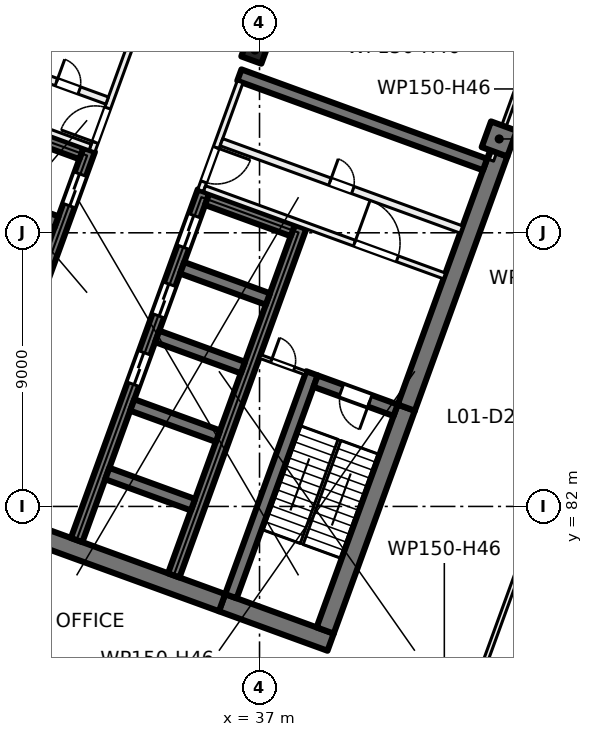
"""IFC4 building model, lengths in metres.
Left out: names, types, materials, properties, quantities, classifications, styles, units other than length and angle.
Written with IfcOpenShell. Run it as: python <this file> out.ifc"""

import sys

from ifc_helpers import new_model, si_unit, direction, frame, frame_2d, origin, origin_2d, place, context, subcontext, project, spatial, rectangle, extrude, element, fill, save


model = new_model("IFC4")
c1 = context("Model", 3, precision=1e-05, world=origin(), true_north=direction((0.0, 1.0)))
c2 = subcontext(c1, "Body", "Model", "MODEL_VIEW")
j1 = project(units=[si_unit("LENGTHUNIT", "METRE"), si_unit("PLANEANGLEUNIT", "RADIAN")], contexts=[c1])
p1 = place(None, origin())
s1 = spatial("IfcSite", under=j1, at=p1, CompositionType="ELEMENT")
p2 = place(p1, origin())
s2 = spatial("IfcBuilding", under=s1, at=p2, CompositionType="ELEMENT")
p3 = place(p2, frame((0.0, 0.0, 7.5)))
s3 = spatial("IfcBuildingStorey", under=s2, at=p3, CompositionType="ELEMENT", Elevation=7.5)
p4 = place(p3, frame((36.849, 97.011, 0.0), z_axis=(0.0, 0.0, 1.0), x_axis=(-0.342020143326, -0.939692620786, 0.0)))
e1 = element("IfcColumn", 1, at=p4, inside=s3, PredefinedType="COLUMN", context=c2, shape_type="SweptSolid", body=[
    extrude(rectangle(XDim=0.7, YDim=0.7, at=origin_2d()), origin(), (0.0, 0.0, 1.0), 5.0),
])
p5 = place(p3, frame((44.884, 94.087, 0.0), z_axis=(0.0, 0.0, 1.0), x_axis=(-0.342020143326, -0.939692620786, 0.0)))
e2 = element("IfcColumn", 2, at=p5, inside=s3, PredefinedType="COLUMN", context=c2, shape_type="SweptSolid", body=[
    extrude(rectangle(XDim=0.9, YDim=0.9, at=origin_2d()), origin(), (0.0, 0.0, 1.0), 5.0),
])
p6 = place(p3, frame((39.338, 77.535, 0.0), z_axis=(0.0, 0.0, 1.0), x_axis=(-0.939701471648, 0.341995824804, 0.0)))
e3 = element("IfcWall", 3, at=p6, inside=s3, PredefinedType="SHEAR", context=c2, shape_type="SweptSolid", body=[
    extrude(rectangle(XDim=3.8, YDim=0.6, at=frame_2d((1.9, 0.0))), origin(), (0.0, 0.0, 1.0), 5.0),
])
p7 = place(p3, frame((35.767, 78.835, 0.0), z_axis=(0.0, 0.0, 1.0), x_axis=(-0.939692894512, 0.342019391267, 0.0)))
e4 = element("IfcWall", 4, at=p7, inside=s3, PredefinedType="SHEAR", context=c2, shape_type="SweptSolid", body=[
    extrude(rectangle(XDim=14.4, YDim=0.6, at=frame_2d((7.2, 0.0))), origin(), (0.0, 0.0, 1.0), 5.0),
])
p8 = place(p3, frame((39.159, 77.92, 0.0), z_axis=(0.0, 0.0, 1.0), x_axis=(0.342016982193, 0.939693771338, 0.0)))
e5 = element("IfcWall", 5, at=p8, inside=s3, PredefinedType="SHEAR", context=c2, shape_type="SweptSolid", body=[
    extrude(rectangle(XDim=7.8, YDim=0.6, at=frame_2d((3.9, 0.0))), origin(), (0.0, 0.0, 1.0), 5.0),
])
p9 = place(p3, frame((41.827, 85.249, 0.0), z_axis=(0.0, 0.0, 1.0), x_axis=(0.342016162452, 0.939694069696, 0.0)))
e6 = element("IfcWall", 6, at=p9, inside=s3, PredefinedType="SHEAR", context=c2, shape_type="SweptSolid", body=[
    extrude(rectangle(XDim=8.9, YDim=0.6, at=frame_2d((4.45, 0.0))), origin(), (0.0, 0.0, 1.0), 5.0),
])
p10 = place(p3, frame((36.058, 79.048, 0.0), z_axis=(0.0, 0.0, 1.0), x_axis=(0.342016982193, 0.939693771338, 0.0)))
e7 = element("IfcWall", 7, at=p10, inside=s3, PredefinedType="SHEAR", context=c2, shape_type="SweptSolid", body=[
    extrude(rectangle(XDim=7.8, YDim=0.4, at=frame_2d((3.9, 0.0))), origin(), (0.0, 0.0, 1.0), 5.0),
])
p11 = place(p3, frame((41.476, 85.164, 0.0), z_axis=(0.0, 0.0, 1.0), x_axis=(-0.939678810556, 0.342058084236, 0.0)))
e8 = element("IfcWall", 8, at=p11, inside=s3, PredefinedType="SHEAR", context=c2, shape_type="SweptSolid", body=[
    extrude(rectangle(XDim=2.8, YDim=0.4, at=frame_2d((1.4, 0.0))), origin(), (0.0, 0.0, 1.0), 5.0),
])
p12 = place(p11, frame((0.9, 0.0, 0.0)))
e9 = element("IfcOpeningElement", 9, at=p12, cuts=e8, PredefinedType="OPENING", context=c2, shape_type="SweptSolid", body=[
    extrude(rectangle(XDim=1.0, YDim=2.1, at=frame_2d((0.5, 1.05))), frame((0.0, 0.21, 0.0), z_axis=(0.0, -1.0, 0.0), x_axis=(1.0, 0.0, 0.0)), (0.0, 0.0, 1.0), 0.42),
])
p13 = place(p3, frame((30.984, 80.895, 0.0), z_axis=(0.0, 0.0, 1.0), x_axis=(0.342021021735, 0.939692301071, 0.0)))
e10 = element("IfcWall", 10, at=p13, inside=s3, PredefinedType="SHEAR", context=c2, shape_type="SweptSolid", body=[
    extrude(rectangle(XDim=12.2, YDim=0.4, at=frame_2d((6.1, 0.0))), origin(), (0.0, 0.0, 1.0), 5.0),
])
p14 = place(p13, frame((5.45, 0.0, 0.0)))
e11 = element("IfcOpeningElement", 11, at=p14, cuts=e10, PredefinedType="OPENING", context=c2, shape_type="SweptSolid", body=[
    extrude(rectangle(XDim=1.1, YDim=2.1, at=frame_2d((0.55, 1.05))), frame((0.0, 0.21, 0.0), z_axis=(0.0, -1.0, 0.0), x_axis=(1.0, 0.0, 0.0)), (0.0, 0.0, 1.0), 0.42),
])
p15 = place(p13, frame((7.85, 0.0, 0.0)))
e12 = element("IfcOpeningElement", 12, at=p15, cuts=e10, PredefinedType="OPENING", context=c2, shape_type="SweptSolid", body=[
    extrude(rectangle(XDim=1.1, YDim=2.1, at=frame_2d((0.55, 1.05))), frame((0.0, 0.21, 0.0), z_axis=(0.0, -1.0, 0.0), x_axis=(1.0, 0.0, 0.0)), (0.0, 0.0, 1.0), 0.42),
])
p16 = place(p13, frame((10.25, 0.0, 0.0)))
e13 = element("IfcOpeningElement", 13, at=p16, cuts=e10, PredefinedType="OPENING", context=c2, shape_type="SweptSolid", body=[
    extrude(rectangle(XDim=1.1, YDim=2.1, at=frame_2d((0.55, 1.05))), frame((0.0, 0.21, 0.0), z_axis=(0.0, -1.0, 0.0), x_axis=(1.0, 0.0, 0.0)), (0.0, 0.0, 1.0), 0.42),
])
p17 = place(p3, frame((34.178, 79.732, 0.0), z_axis=(0.0, 0.0, 1.0), x_axis=(0.342014590177, 0.939694641948, 0.0)))
e14 = element("IfcWall", 14, at=p17, inside=s3, PredefinedType="SHEAR", context=c2, shape_type="SweptSolid", body=[
    extrude(rectangle(XDim=12.2, YDim=0.4, at=frame_2d((6.1, 0.0))), origin(), (0.0, 0.0, 1.0), 5.0),
])
for number, where, z_axis, x_axis in (
    (15, (34.812, 82.056, 0.0), (0.0, 0.0, 1.0), (-0.94, 0.342, 0.0)),
    (16, (35.632, 84.311, 0.0), (0.0, 0.0, 1.0), (-0.94, 0.342, 0.0)),
    (17, (36.453, 86.566, 0.0), (0.0, 0.0, 1.0), (-0.94, 0.342, 0.0)),
    (18, (37.274, 88.822, 0.0), (0.0, 0.0, 1.0), (-0.94, 0.342, 0.0)),
):
    element("IfcWall", number, at=place(p3, frame(where, z_axis=z_axis, x_axis=x_axis)), inside=s3, PredefinedType="SHEAR", context=c2, shape_type="SweptSolid", body=[
        extrude(rectangle(XDim=3.0, YDim=0.4, at=frame_2d((1.5, 0.0))), origin(), (0.0, 0.0, 1.0), 5.0),
    ])
p18 = place(p3, frame((38.095, 91.077, 0.0), z_axis=(0.0, 0.0, 1.0), x_axis=(-0.939676934218, 0.342063238742, 0.0)))
e19 = element("IfcWall", 19, at=p18, inside=s3, PredefinedType="SHEAR", context=c2, shape_type="SweptSolid", body=[
    extrude(rectangle(XDim=3.0, YDim=0.4, at=frame_2d((1.5, 0.0))), origin(), (0.0, 0.0, 1.0), 5.0),
])
p19 = place(p3, frame((27.225, 82.263, 0.0), z_axis=(0.0, 0.0, 1.0), x_axis=(0.342014590177, 0.939694641948, 0.0)))
e20 = element("IfcWall", 20, at=p19, inside=s3, PredefinedType="SHEAR", context=c2, shape_type="SweptSolid", body=[
    extrude(rectangle(XDim=12.2, YDim=0.4, at=frame_2d((6.1, 0.0))), origin(), (0.0, 0.0, 1.0), 5.0),
])
p20 = place(p19, frame((10.25, 0.0, 0.0)))
e21 = element("IfcOpeningElement", 21, at=p20, cuts=e20, PredefinedType="OPENING", context=c2, shape_type="SweptSolid", body=[
    extrude(rectangle(XDim=1.1, YDim=2.1, at=frame_2d((0.55, 1.05))), frame((0.0, 0.21, 0.0), z_axis=(0.0, -1.0, 0.0), x_axis=(1.0, 0.0, 0.0)), (0.0, 0.0, 1.0), 0.42),
])
p21 = place(p19, frame((0.7, 0.0, 0.0)))
e22 = element("IfcOpeningElement", 22, at=p21, cuts=e20, PredefinedType="OPENING", context=c2, shape_type="SweptSolid", body=[
    extrude(rectangle(XDim=0.8, YDim=2.1, at=frame_2d((0.4, 1.05))), frame((0.0, 0.21, 0.0), z_axis=(0.0, -1.0, 0.0), x_axis=(1.0, 0.0, 0.0)), (0.0, 0.0, 1.0), 0.42),
])
for number, where, z_axis, x_axis in (
    (23, (30.32, 91.353, 0.0), (0.0, 0.0, 1.0), (-0.94, 0.342, 0.0)),
    (24, (31.141, 93.608, 0.0), (0.0, 0.0, 1.0), (-0.94, 0.342, 0.0)),
):
    element("IfcWall", number, at=place(p3, frame(where, z_axis=z_axis, x_axis=x_axis)), inside=s3, PredefinedType="SHEAR", context=c2, shape_type="SweptSolid", body=[
        extrude(rectangle(XDim=3.0, YDim=0.4, at=frame_2d((1.5, 0.0))), origin(), (0.0, 0.0, 1.0), 5.0),
    ])
p22 = place(p3, frame((44.418, 93.245, 0.0), z_axis=(0.0, 0.0, 1.0), x_axis=(-0.93969060187, 0.342025690201, 0.0)))
e25 = element("IfcWall", 25, at=p22, inside=s3, PredefinedType="SHEAR", context=c2, shape_type="SweptSolid", body=[
    extrude(rectangle(XDim=8.6, YDim=0.4, at=frame_2d((4.3, 0.0))), origin(), (0.0, 0.0, 1.0), 5.0),
])
p23 = place(p3, frame((31.491, 93.693, 0.0), z_axis=(0.0, 0.0, 1.0), x_axis=(0.341995824804, 0.939701471648, 0.0)))
e26 = element("IfcWall", 26, at=p23, inside=s3, PredefinedType="PARTITIONING", context=c2, shape_type="SweptSolid", body=[
    extrude(rectangle(XDim=3.8, YDim=0.2, at=frame_2d((1.9, 0.0))), origin(), (0.0, 0.0, 1.0), 4.6),
])
p24 = place(p23, frame((0.3, 0.0, 0.0)))
e27 = element("IfcOpeningElement", 27, at=p24, cuts=e26, PredefinedType="OPENING", context=c2, shape_type="SweptSolid", body=[
    extrude(rectangle(XDim=1.2, YDim=2.1, at=frame_2d((0.6, 1.05))), frame((0.0, 0.11, 0.0), z_axis=(0.0, -1.0, 0.0), x_axis=(1.0, 0.0, 0.0)), (0.0, 0.0, 1.0), 0.22),
])
p25 = place(p3, frame((23.538, 96.694, 0.0), z_axis=(0.0, 0.0, 1.0), x_axis=(0.939691552312, -0.342023078919, 0.0)))
e28 = element("IfcWall", 28, at=p25, inside=s3, PredefinedType="PARTITIONING", context=c2, shape_type="SweptSolid", body=[
    extrude(rectangle(XDim=8.4, YDim=0.2, at=frame_2d((4.2, 0.0))), origin(), (0.0, 0.0, 1.0), 4.6),
])
p26 = place(p25, frame((1.65, 0.0, 0.0)))
e29 = element("IfcOpeningElement", 29, at=p26, cuts=e28, PredefinedType="OPENING", context=c2, shape_type="SweptSolid", body=[
    extrude(rectangle(XDim=1.5, YDim=2.1, at=frame_2d((0.75, 1.05))), frame((0.0, 0.11, 0.0), z_axis=(0.0, -1.0, 0.0), x_axis=(1.0, 0.0, 0.0)), (0.0, 0.0, 1.0), 0.22),
])
p27 = place(p3, frame((24.094, 98.221, 0.0), z_axis=(0.0, 0.0, 1.0), x_axis=(0.939691552312, -0.342023078919, 0.0)))
e30 = element("IfcWall", 30, at=p27, inside=s3, PredefinedType="PARTITIONING", context=c2, shape_type="SweptSolid", body=[
    extrude(rectangle(XDim=8.4, YDim=0.25, at=frame_2d((4.2, 0.0))), origin(), (0.0, 0.0, 1.0), 4.6),
])
p28 = place(p27, frame((6.625, 0.0, 0.0)))
e31 = element("IfcOpeningElement", 31, at=p28, cuts=e30, PredefinedType="OPENING", context=c2, shape_type="SweptSolid", body=[
    extrude(rectangle(XDim=0.8, YDim=2.1, at=frame_2d((0.4, 1.05))), frame((0.0, 0.135, 0.0), z_axis=(0.0, -1.0, 0.0), x_axis=(1.0, 0.0, 0.0)), (0.0, 0.0, 1.0), 0.27),
])
p29 = place(p27, frame((2.275, 0.0, 0.0)))
e32 = element("IfcOpeningElement", 32, at=p29, cuts=e30, PredefinedType="OPENING", context=c2, shape_type="SweptSolid", body=[
    extrude(rectangle(XDim=1.0, YDim=2.1, at=frame_2d((0.5, 1.05))), frame((0.0, 0.135, 0.0), z_axis=(0.0, -1.0, 0.0), x_axis=(1.0, 0.0, 0.0)), (0.0, 0.0, 1.0), 0.27),
])
p30 = place(p3, frame((36.362, 95.964, 0.0), z_axis=(0.0, 0.0, 1.0), x_axis=(-0.341995824804, -0.939701471648, 0.0)))
e33 = element("IfcWall", 33, at=p30, inside=s3, PredefinedType="PARTITIONING", context=c2, shape_type="SweptSolid", body=[
    extrude(rectangle(XDim=3.8, YDim=0.2, at=frame_2d((1.9, 0.0))), origin(), (0.0, 0.0, 1.0), 4.6),
])
p31 = place(p30, frame((2.3, 0.0, 0.0)))
e34 = element("IfcOpeningElement", 34, at=p31, cuts=e33, PredefinedType="OPENING", context=c2, shape_type="SweptSolid", body=[
    extrude(rectangle(XDim=1.2, YDim=2.1, at=frame_2d((0.6, 1.05))), frame((0.0, 0.11, 0.0), z_axis=(0.0, -1.0, 0.0), x_axis=(1.0, 0.0, 0.0)), (0.0, 0.0, 1.0), 0.22),
])
p32 = place(p3, frame((35.19, 92.453, 0.0), z_axis=(0.0, 0.0, 1.0), x_axis=(0.939691552312, -0.342023078919, 0.0)))
e35 = element("IfcWall", 35, at=p32, inside=s3, PredefinedType="PARTITIONING", context=c2, shape_type="SweptSolid", body=[
    extrude(rectangle(XDim=8.4, YDim=0.2, at=frame_2d((4.2, 0.0))), origin(), (0.0, 0.0, 1.0), 4.6),
])
p33 = place(p32, frame((5.25, 0.0, 0.0)))
e36 = element("IfcOpeningElement", 36, at=p33, cuts=e35, PredefinedType="OPENING", context=c2, shape_type="SweptSolid", body=[
    extrude(rectangle(XDim=1.5, YDim=2.1, at=frame_2d((0.75, 1.05))), frame((0.0, 0.11, 0.0), z_axis=(0.0, -1.0, 0.0), x_axis=(1.0, 0.0, 0.0)), (0.0, 0.0, 1.0), 0.22),
])
p34 = place(p3, frame((35.746, 93.98, 0.0), z_axis=(0.0, 0.0, 1.0), x_axis=(0.939691552312, -0.342023078919, 0.0)))
e37 = element("IfcWall", 37, at=p34, inside=s3, PredefinedType="PARTITIONING", context=c2, shape_type="SweptSolid", body=[
    extrude(rectangle(XDim=8.4, YDim=0.25, at=frame_2d((4.2, 0.0))), origin(), (0.0, 0.0, 1.0), 4.6),
])
p35 = place(p34, frame((3.8, 0.0, 0.0)))
e38 = element("IfcOpeningElement", 38, at=p35, cuts=e37, PredefinedType="OPENING", context=c2, shape_type="SweptSolid", body=[
    extrude(rectangle(XDim=0.8, YDim=2.1, at=frame_2d((0.4, 1.05))), frame((0.0, 0.135, 0.0), z_axis=(0.0, -1.0, 0.0), x_axis=(1.0, 0.0, 0.0)), (0.0, 0.0, 1.0), 0.27),
])
p36 = place(p3, frame((37.013, 86.935, 0.0), z_axis=(0.0, 0.0, 1.0), x_axis=(0.939659694648, -0.342110593602, 0.0)))
e39 = element("IfcWall", 39, at=p36, inside=s3, PredefinedType="PARTITIONING", context=c2, shape_type="SweptSolid", body=[
    extrude(rectangle(XDim=1.6, YDim=0.125, at=frame_2d((0.8, 0.0))), origin(), (0.0, 0.0, 1.0), 4.6),
])
p37 = place(p36, frame((0.4, 0.0, 0.0)))
e40 = element("IfcOpeningElement", 40, at=p37, cuts=e39, PredefinedType="OPENING", context=c2, shape_type="SweptSolid", body=[
    extrude(rectangle(XDim=0.8, YDim=2.1, at=frame_2d((0.4, 1.05))), frame((0.0, 0.073, 0.0), z_axis=(0.0, -1.0, 0.0), x_axis=(1.0, 0.0, 0.0)), (0.0, 0.0, 1.0), 0.145),
])
p38 = place(p3, frame((36.0, 73.11, 0.0), z_axis=(0.0, 0.0, 1.0), x_axis=(-0.939696975073, 0.342008179784, 0.0)))
e41 = element("IfcWall", 41, at=p38, inside=s3, PredefinedType="PARTITIONING", context=c2, shape_type="SweptSolid", body=[
    extrude(rectangle(XDim=19.075, YDim=0.15, at=frame_2d((9.538, 0.0))), origin(), (0.0, 0.0, 1.0), 4.6),
])
p39 = place(p38, frame((9.076, 0.0, 0.0)))
e42 = element("IfcOpeningElement", 42, at=p39, cuts=e41, PredefinedType="OPENING", context=c2, shape_type="SweptSolid", body=[
    extrude(rectangle(XDim=1.0, YDim=2.1, at=frame_2d((0.5, 1.05))), frame((0.0, 0.085, 0.0), z_axis=(0.0, -1.0, 0.0), x_axis=(1.0, 0.0, 0.0)), (0.0, 0.0, 1.0), 0.17),
])
p40 = place(p3, frame((49.196, 90.0, 0.0), z_axis=(0.0, 0.0, 1.0), x_axis=(-0.342037332118, -0.939686364399, 0.0)))
e43 = element("IfcWall", 43, at=p40, inside=s3, PredefinedType="PARTITIONING", context=c2, shape_type="SweptSolid", body=[
    extrude(rectangle(XDim=15.387, YDim=0.15, at=frame_2d((7.693, 0.0))), origin(), (0.0, 0.0, 1.0), 4.6),
])
p41 = place(p40, frame((6.99, 0.0, 0.0)))
e44 = element("IfcOpeningElement", 44, at=p41, cuts=e43, PredefinedType="OPENING", context=c2, shape_type="SweptSolid", body=[
    extrude(rectangle(XDim=1.0, YDim=2.1, at=frame_2d((0.5, 1.05))), frame((0.0, 0.085, 0.0), z_axis=(0.0, -1.0, 0.0), x_axis=(1.0, 0.0, 0.0)), (0.0, 0.0, 1.0), 0.17),
])
p42 = place(p3, frame((44.627, 93.382, 0.0), z_axis=(0.0, 0.0, 1.0), x_axis=(0.342025351501, 0.939690725149, 0.0)))
e45 = element("IfcWall", 45, at=p42, inside=s3, PredefinedType="PARTITIONING", context=c2, shape_type="SweptSolid", body=[
    extrude(rectangle(XDim=5.0, YDim=0.15, at=frame_2d((2.5, 0.0))), origin(), (0.0, 0.0, 1.0), 4.6),
])
p43 = place(p20, origin())
e46 = element("IfcDoor", 46, at=p43, inside=s3, OperationType="DOUBLE_DOOR_SLIDING", PredefinedType="DOOR", context=c2, shape_type="SweptSolid", body=[
    extrude(rectangle(XDim=1.1, YDim=2.1, at=frame_2d((0.55, 1.05))), frame((0.0, 0.025, 0.0), z_axis=(0.0, -1.0, 0.0), x_axis=(1.0, 0.0, 0.0)), (0.0, 0.0, 1.0), 0.05),
])
fill(e21, e46)
p44 = place(p14, origin())
e47 = element("IfcDoor", 47, at=p44, inside=s3, OperationType="DOUBLE_DOOR_SLIDING", PredefinedType="DOOR", context=c2, shape_type="SweptSolid", body=[
    extrude(rectangle(XDim=1.1, YDim=2.1, at=frame_2d((0.55, 1.05))), frame((0.0, 0.025, 0.0), z_axis=(0.0, -1.0, 0.0), x_axis=(1.0, 0.0, 0.0)), (0.0, 0.0, 1.0), 0.05),
])
fill(e11, e47)
p45 = place(p15, origin())
e48 = element("IfcDoor", 48, at=p45, inside=s3, OperationType="DOUBLE_DOOR_SLIDING", PredefinedType="DOOR", context=c2, shape_type="SweptSolid", body=[
    extrude(rectangle(XDim=1.1, YDim=2.1, at=frame_2d((0.55, 1.05))), frame((0.0, 0.025, 0.0), z_axis=(0.0, -1.0, 0.0), x_axis=(1.0, 0.0, 0.0)), (0.0, 0.0, 1.0), 0.05),
])
fill(e12, e48)
p46 = place(p16, origin())
e49 = element("IfcDoor", 49, at=p46, inside=s3, OperationType="DOUBLE_DOOR_SLIDING", PredefinedType="DOOR", context=c2, shape_type="SweptSolid", body=[
    extrude(rectangle(XDim=1.1, YDim=2.1, at=frame_2d((0.55, 1.05))), frame((0.0, 0.025, 0.0), z_axis=(0.0, -1.0, 0.0), x_axis=(1.0, 0.0, 0.0)), (0.0, 0.0, 1.0), 0.05),
])
fill(e13, e49)
p47 = place(p24, origin())
e50 = element("IfcDoor", 50, at=p47, inside=s3, OperationType="DOUBLE_DOOR_SINGLE_SWING", PredefinedType="DOOR", context=c2, shape_type="SweptSolid", body=[
    extrude(rectangle(XDim=1.2, YDim=2.1, at=frame_2d((0.6, 1.05))), frame((0.0, 0.025, 0.0), z_axis=(0.0, -1.0, 0.0), x_axis=(1.0, 0.0, 0.0)), (0.0, 0.0, 1.0), 0.05),
])
fill(e27, e50)
p48 = place(p28, origin())
e51 = element("IfcDoor", 51, at=p48, inside=s3, OperationType="SINGLE_SWING_LEFT", PredefinedType="DOOR", context=c2, shape_type="SweptSolid", body=[
    extrude(rectangle(XDim=0.8, YDim=2.1, at=frame_2d((0.4, 1.05))), frame((0.0, 0.025, 0.0), z_axis=(0.0, -1.0, 0.0), x_axis=(1.0, 0.0, 0.0)), (0.0, 0.0, 1.0), 0.05),
])
fill(e31, e51)
p49 = place(p31, origin())
e52 = element("IfcDoor", 52, at=p49, inside=s3, OperationType="DOUBLE_DOOR_SINGLE_SWING", PredefinedType="DOOR", context=c2, shape_type="SweptSolid", body=[
    extrude(rectangle(XDim=1.2, YDim=2.1, at=frame_2d((0.6, 1.05))), frame((0.0, 0.025, 0.0), z_axis=(0.0, -1.0, 0.0), x_axis=(1.0, 0.0, 0.0)), (0.0, 0.0, 1.0), 0.05),
])
fill(e34, e52)
p50 = place(p33, origin())
e53 = element("IfcDoor", 53, at=p50, inside=s3, OperationType="DOUBLE_DOOR_SINGLE_SWING", PredefinedType="DOOR", context=c2, shape_type="SweptSolid", body=[
    extrude(rectangle(XDim=1.5, YDim=2.1, at=frame_2d((0.75, 1.05))), frame((0.0, 0.025, 0.0), z_axis=(0.0, -1.0, 0.0), x_axis=(1.0, 0.0, 0.0)), (0.0, 0.0, 1.0), 0.05),
])
fill(e36, e53)
p51 = place(p12, origin())
e54 = element("IfcDoor", 54, at=p51, inside=s3, OperationType="SINGLE_SWING_RIGHT", PredefinedType="DOOR", context=c2, shape_type="SweptSolid", body=[
    extrude(rectangle(XDim=1.0, YDim=2.1, at=frame_2d((0.5, 1.05))), frame((0.0, 0.025, 0.0), z_axis=(0.0, -1.0, 0.0), x_axis=(1.0, 0.0, 0.0)), (0.0, 0.0, 1.0), 0.05),
])
fill(e9, e54)
p52 = place(p37, origin())
e55 = element("IfcDoor", 55, at=p52, inside=s3, OperationType="SINGLE_SWING_LEFT", PredefinedType="DOOR", context=c2, shape_type="SweptSolid", body=[
    extrude(rectangle(XDim=0.8, YDim=2.1, at=frame_2d((0.4, 1.05))), frame((0.0, 0.025, 0.0), z_axis=(0.0, -1.0, 0.0), x_axis=(1.0, 0.0, 0.0)), (0.0, 0.0, 1.0), 0.05),
])
fill(e40, e55)
p53 = place(p35, origin())
e56 = element("IfcDoor", 56, at=p53, inside=s3, OperationType="SINGLE_SWING_RIGHT", PredefinedType="DOOR", context=c2, shape_type="SweptSolid", body=[
    extrude(rectangle(XDim=0.8, YDim=2.1, at=frame_2d((0.4, 1.05))), frame((0.0, 0.025, 0.0), z_axis=(0.0, -1.0, 0.0), x_axis=(1.0, 0.0, 0.0)), (0.0, 0.0, 1.0), 0.05),
])
fill(e38, e56)
save(model, sys.argv[1])
